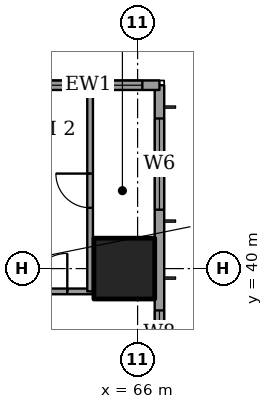
"""IFC4 building model, lengths in metres.
Left out: names, types, materials, properties, quantities, classifications, styles, units other than length and angle.
Written with IfcOpenShell. Run it as: python <this file> out.ifc"""

import sys

from ifc_helpers import new_model, si_unit, direction, frame, frame_2d, origin, origin_2d, place, context, subcontext, project, spatial, rectangle, extrude, element, fill, save


model = new_model("IFC4")
c1 = context("Model", 3, precision=1e-05, world=origin(), true_north=direction((0.0, 1.0)))
c2 = subcontext(c1, "Body", "Model", "MODEL_VIEW")
j1 = project(units=[si_unit("LENGTHUNIT", "METRE"), si_unit("PLANEANGLEUNIT", "RADIAN")], contexts=[c1])
p1 = place(None, origin())
s1 = spatial("IfcSite", under=j1, at=p1, CompositionType="ELEMENT")
p2 = place(p1, origin())
s2 = spatial("IfcBuilding", under=s1, at=p2, CompositionType="ELEMENT")
p3 = place(p2, frame((0.0, 0.0, 252.0)))
s3 = spatial("IfcBuildingStorey", under=s2, at=p3, CompositionType="ELEMENT", Elevation=252.0)
p4 = place(p3, frame((65.65, 40.0, 0.0), z_axis=(0.0, 0.0, 1.0), x_axis=(1.0, 0.0, 0.0)))
e1 = element("IfcColumn", 1, at=p4, inside=s3, PredefinedType="COLUMN", context=c2, shape_type="SweptSolid", body=[
    extrude(rectangle(XDim=1.6, YDim=1.6, at=origin_2d()), origin(), (0.0, 0.0, 1.0), 3.6),
])
p5 = place(p3, frame((66.575, 3.175, 0.0), z_axis=(0.0, 0.0, 1.0), x_axis=(0.0, 1.0, 0.0)))
e2 = element("IfcWall", 2, at=p5, inside=s3, PredefinedType="SOLIDWALL", context=c2, shape_type="SweptSolid", body=[
    extrude(rectangle(XDim=41.65, YDim=0.25, at=frame_2d((20.825, 0.0))), origin(), (0.0, 0.0, 1.0), 3.6),
])
p6 = place(p5, frame((0.875, 0.0, 0.6)))
e3 = element("IfcOpeningElement", 3, at=p6, cuts=e2, PredefinedType="OPENING", context=c2, shape_type="SweptSolid", body=[
    extrude(rectangle(XDim=2.4, YDim=2.0, at=frame_2d((1.2, 1.0))), frame((0.0, 0.135, 0.0), z_axis=(0.0, -1.0, 0.0), x_axis=(1.0, 0.0, 0.0)), (0.0, 0.0, 1.0), 0.27),
])
p7 = place(p5, frame((6.6, 0.0, 0.6)))
e4 = element("IfcOpeningElement", 4, at=p7, cuts=e2, PredefinedType="OPENING", context=c2, shape_type="SweptSolid", body=[
    extrude(rectangle(XDim=1.2, YDim=2.0, at=frame_2d((0.6, 1.0))), frame((0.0, 0.135, 0.0), z_axis=(0.0, -1.0, 0.0), x_axis=(1.0, 0.0, 0.0)), (0.0, 0.0, 1.0), 0.27),
])
p8 = place(p5, frame((8.825, 0.0, 0.6)))
e5 = element("IfcOpeningElement", 5, at=p8, cuts=e2, PredefinedType="OPENING", context=c2, shape_type="SweptSolid", body=[
    extrude(rectangle(XDim=2.4, YDim=2.0, at=frame_2d((1.2, 1.0))), frame((0.0, 0.135, 0.0), z_axis=(0.0, -1.0, 0.0), x_axis=(1.0, 0.0, 0.0)), (0.0, 0.0, 1.0), 0.27),
])
p9 = place(p5, frame((15.725, 0.0, 0.6)))
e6 = element("IfcOpeningElement", 6, at=p9, cuts=e2, PredefinedType="OPENING", context=c2, shape_type="SweptSolid", body=[
    extrude(rectangle(XDim=2.4, YDim=2.0, at=frame_2d((1.2, 1.0))), frame((0.0, 0.135, 0.0), z_axis=(0.0, -1.0, 0.0), x_axis=(1.0, 0.0, 0.0)), (0.0, 0.0, 1.0), 0.27),
])
p10 = place(p5, frame((23.625, 0.0, 0.6)))
e7 = element("IfcOpeningElement", 7, at=p10, cuts=e2, PredefinedType="OPENING", context=c2, shape_type="SweptSolid", body=[
    extrude(rectangle(XDim=2.4, YDim=2.0, at=frame_2d((1.2, 1.0))), frame((0.0, 0.135, 0.0), z_axis=(0.0, -1.0, 0.0), x_axis=(1.0, 0.0, 0.0)), (0.0, 0.0, 1.0), 0.27),
])
p11 = place(p5, frame((30.725, 0.0, 0.6)))
e8 = element("IfcOpeningElement", 8, at=p11, cuts=e2, PredefinedType="OPENING", context=c2, shape_type="SweptSolid", body=[
    extrude(rectangle(XDim=2.4, YDim=2.0, at=frame_2d((1.2, 1.0))), frame((0.0, 0.135, 0.0), z_axis=(0.0, -1.0, 0.0), x_axis=(1.0, 0.0, 0.0)), (0.0, 0.0, 1.0), 0.27),
])
p12 = place(p5, frame((34.525, 0.0, 0.6)))
e9 = element("IfcOpeningElement", 9, at=p12, cuts=e2, PredefinedType="OPENING", context=c2, shape_type="SweptSolid", body=[
    extrude(rectangle(XDim=1.2, YDim=2.0, at=frame_2d((0.6, 1.0))), frame((0.0, 0.135, 0.0), z_axis=(0.0, -1.0, 0.0), x_axis=(1.0, 0.0, 0.0)), (0.0, 0.0, 1.0), 0.27),
])
p13 = place(p5, frame((38.375, 0.0, 0.6)))
e10 = element("IfcOpeningElement", 10, at=p13, cuts=e2, PredefinedType="OPENING", context=c2, shape_type="SweptSolid", body=[
    extrude(rectangle(XDim=2.4, YDim=2.0, at=frame_2d((1.2, 1.0))), frame((0.0, 0.135, 0.0), z_axis=(0.0, -1.0, 0.0), x_axis=(1.0, 0.0, 0.0)), (0.0, 0.0, 1.0), 0.27),
])
p14 = place(p3, frame((66.575, 44.825, 0.0), z_axis=(0.0, 0.0, 1.0), x_axis=(-1.0, 0.0, 0.0)))
e11 = element("IfcWall", 11, at=p14, inside=s3, PredefinedType="SOLIDWALL", context=c2, shape_type="SweptSolid", body=[
    extrude(rectangle(XDim=3.75, YDim=0.25, at=frame_2d((1.875, 0.0))), origin(), (0.0, 0.0, 1.0), 3.6),
])
p15 = place(p14, frame((0.45, 0.0, 0.6)))
e12 = element("IfcOpeningElement", 12, at=p15, cuts=e11, PredefinedType="OPENING", context=c2, shape_type="SweptSolid", body=[
    extrude(rectangle(XDim=1.2, YDim=2.0, at=frame_2d((0.6, 1.0))), frame((0.0, 0.135, 0.0), z_axis=(0.0, -1.0, 0.0), x_axis=(1.0, 0.0, 0.0)), (0.0, 0.0, 1.0), 0.27),
])
p16 = place(p14, frame((2.188, 0.0, 0.6)))
e13 = element("IfcOpeningElement", 13, at=p16, cuts=e11, PredefinedType="OPENING", context=c2, shape_type="SweptSolid", body=[
    extrude(rectangle(XDim=1.2, YDim=2.0, at=frame_2d((0.6, 1.0))), frame((0.0, 0.135, 0.0), z_axis=(0.0, -1.0, 0.0), x_axis=(1.0, 0.0, 0.0)), (0.0, 0.0, 1.0), 0.27),
])
p17 = place(p3, frame((58.8, 39.4, 0.0), z_axis=(0.0, 0.0, 1.0), x_axis=(1.0, 0.0, 0.0)))
e14 = element("IfcWall", 14, at=p17, inside=s3, PredefinedType="PARTITIONING", context=c2, shape_type="SweptSolid", body=[
    extrude(rectangle(XDim=6.05, YDim=0.15, at=frame_2d((3.025, 0.0))), origin(), (0.0, 0.0, 1.0), 3.35),
])
p18 = place(p17, frame((4.35, 0.0, 0.0)))
e15 = element("IfcOpeningElement", 15, at=p18, cuts=e14, PredefinedType="OPENING", context=c2, shape_type="SweptSolid", body=[
    extrude(rectangle(XDim=1.0, YDim=2.1, at=frame_2d((0.5, 1.05))), frame((0.0, 0.085, 0.0), z_axis=(0.0, -1.0, 0.0), x_axis=(1.0, 0.0, 0.0)), (0.0, 0.0, 1.0), 0.17),
])
p19 = place(p17, frame((0.475, 0.0, 0.0)))
e16 = element("IfcOpeningElement", 16, at=p19, cuts=e14, PredefinedType="OPENING", context=c2, shape_type="SweptSolid", body=[
    extrude(rectangle(XDim=1.0, YDim=2.1, at=frame_2d((0.5, 1.05))), frame((0.0, 0.085, 0.0), z_axis=(0.0, -1.0, 0.0), x_axis=(1.0, 0.0, 0.0)), (0.0, 0.0, 1.0), 0.17),
])
p20 = place(p3, frame((64.75, 39.4, 0.0), z_axis=(0.0, 0.0, 1.0), x_axis=(0.0, 1.0, 0.0)))
e17 = element("IfcWall", 17, at=p20, inside=s3, PredefinedType="PARTITIONING", context=c2, shape_type="SweptSolid", body=[
    extrude(rectangle(XDim=5.3, YDim=0.15, at=frame_2d((2.65, 0.0))), origin(), (0.0, 0.0, 1.0), 3.35),
])
p21 = place(p20, frame((2.2, 0.0, 0.0)))
e18 = element("IfcOpeningElement", 18, at=p21, cuts=e17, PredefinedType="OPENING", context=c2, shape_type="SweptSolid", body=[
    extrude(rectangle(XDim=0.9, YDim=2.1, at=frame_2d((0.45, 1.05))), frame((0.0, 0.085, 0.0), z_axis=(0.0, -1.0, 0.0), x_axis=(1.0, 0.0, 0.0)), (0.0, 0.0, 1.0), 0.17),
])
p22 = place(p12, origin())
e19 = element("IfcWindow", 19, at=p22, inside=s3, PartitioningType="SINGLE_PANEL", PredefinedType="WINDOW", context=c2, shape_type="SweptSolid", body=[
    extrude(rectangle(XDim=1.2, YDim=2.0, at=frame_2d((0.6, 1.0))), frame((0.0, 0.03, 0.0), z_axis=(0.0, -1.0, 0.0), x_axis=(1.0, 0.0, 0.0)), (0.0, 0.0, 1.0), 0.06),
])
fill(e9, e19)
p23 = place(p13, origin())
e20 = element("IfcWindow", 20, at=p23, inside=s3, PartitioningType="SINGLE_PANEL", PredefinedType="WINDOW", context=c2, shape_type="SweptSolid", body=[
    extrude(rectangle(XDim=2.4, YDim=2.0, at=frame_2d((1.2, 1.0))), frame((0.0, 0.03, 0.0), z_axis=(0.0, -1.0, 0.0), x_axis=(1.0, 0.0, 0.0)), (0.0, 0.0, 1.0), 0.06),
])
fill(e10, e20)
p24 = place(p15, origin())
e21 = element("IfcWindow", 21, at=p24, inside=s3, PartitioningType="SINGLE_PANEL", PredefinedType="WINDOW", context=c2, shape_type="SweptSolid", body=[
    extrude(rectangle(XDim=1.2, YDim=2.0, at=frame_2d((0.6, 1.0))), frame((0.0, 0.03, 0.0), z_axis=(0.0, -1.0, 0.0), x_axis=(1.0, 0.0, 0.0)), (0.0, 0.0, 1.0), 0.06),
])
fill(e12, e21)
p25 = place(p16, origin())
e22 = element("IfcWindow", 22, at=p25, inside=s3, PartitioningType="SINGLE_PANEL", PredefinedType="WINDOW", context=c2, shape_type="SweptSolid", body=[
    extrude(rectangle(XDim=1.2, YDim=2.0, at=frame_2d((0.6, 1.0))), frame((0.0, 0.03, 0.0), z_axis=(0.0, -1.0, 0.0), x_axis=(1.0, 0.0, 0.0)), (0.0, 0.0, 1.0), 0.06),
])
fill(e13, e22)
p26 = place(p21, origin())
e23 = element("IfcDoor", 23, at=p26, inside=s3, OperationType="SINGLE_SWING_LEFT", PredefinedType="DOOR", context=c2, shape_type="SweptSolid", body=[
    extrude(rectangle(XDim=0.9, YDim=2.1, at=frame_2d((0.45, 1.05))), frame((0.0, 0.025, 0.0), z_axis=(0.0, -1.0, 0.0), x_axis=(1.0, 0.0, 0.0)), (0.0, 0.0, 1.0), 0.05),
])
fill(e18, e23)
p27 = place(p18, origin())
e24 = element("IfcDoor", 24, at=p27, inside=s3, OperationType="SINGLE_SWING_LEFT", PredefinedType="DOOR", context=c2, shape_type="SweptSolid", body=[
    extrude(rectangle(XDim=1.0, YDim=2.1, at=frame_2d((0.5, 1.05))), frame((0.0, 0.025, 0.0), z_axis=(0.0, -1.0, 0.0), x_axis=(1.0, 0.0, 0.0)), (0.0, 0.0, 1.0), 0.05),
])
fill(e15, e24)
save(model, sys.argv[1])
